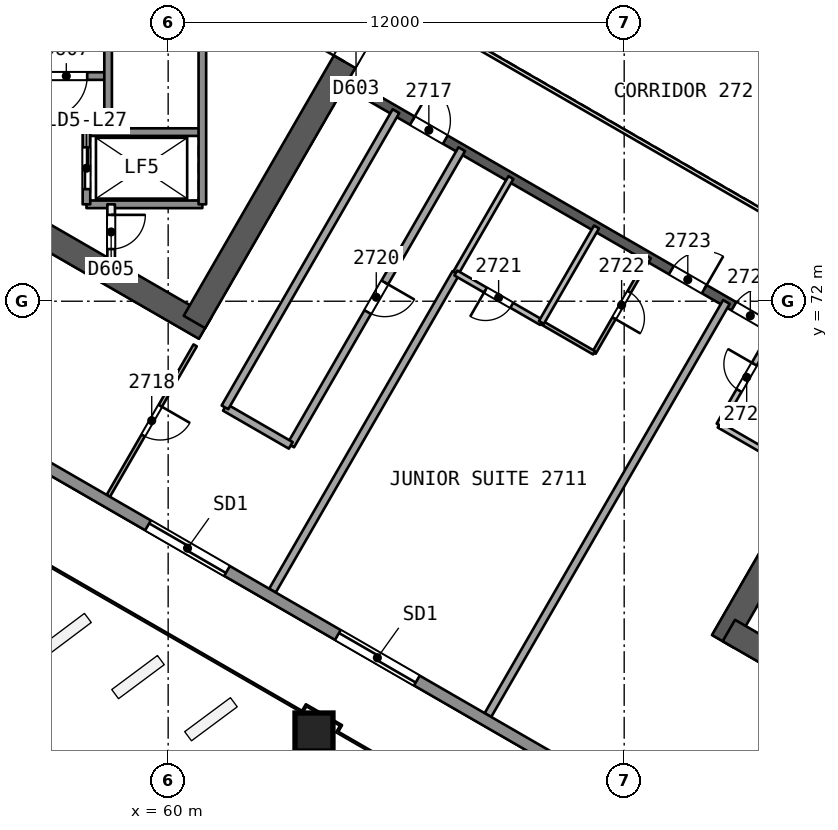
"""IFC4 building model, lengths in metres.
Left out: names, types, materials, properties, quantities, classifications, styles, units other than length and angle.
Written with IfcOpenShell. Run it as: python <this file> out.ifc"""

import sys

from ifc_helpers import new_model, si_unit, direction, frame, frame_2d, origin, origin_2d, place, context, subcontext, project, spatial, rectangle, extrude, element, fill, save


model = new_model("IFC4")
c1 = context("Model", 3, precision=1e-05, world=origin(), true_north=direction((0.0, 1.0)))
c2 = subcontext(c1, "Body", "Model", "MODEL_VIEW")
j1 = project(units=[si_unit("LENGTHUNIT", "METRE"), si_unit("PLANEANGLEUNIT", "RADIAN")], contexts=[c1])
p1 = place(None, origin())
s1 = spatial("IfcSite", under=j1, at=p1, CompositionType="ELEMENT")
p2 = place(p1, origin())
s2 = spatial("IfcBuilding", under=s1, at=p2, CompositionType="ELEMENT")
p3 = place(p2, frame((0.0, 0.0, 114.2)))
s3 = spatial("IfcBuildingStorey", under=s2, at=p3, CompositionType="ELEMENT", Elevation=114.2)
p4 = place(p3, frame((48.722, 78.365, 0.0), z_axis=(0.0, 0.0, 1.0), x_axis=(0.866020036431, -0.500009296414, 0.0)))
e1 = element("IfcWall", 1, at=p4, inside=s3, PredefinedType="SHEAR", context=c2, shape_type="SweptSolid", body=[
    extrude(rectangle(XDim=14.146, YDim=0.65, at=frame_2d((7.073, 0.0))), origin(), (0.0, 0.0, 1.0), 3.7),
])
p5 = place(p3, frame((60.691, 71.455, 0.0), z_axis=(0.0, 0.0, 1.0), x_axis=(0.499983075189, 0.866035175108, 0.0)))
e2 = element("IfcWall", 2, at=p5, inside=s3, PredefinedType="SHEAR", context=c2, shape_type="SweptSolid", body=[
    extrude(rectangle(XDim=10.055, YDim=0.65, at=frame_2d((5.027, 0.0))), origin(), (0.0, 0.0, 1.0), 3.7),
])
p6 = place(p5, frame((7.905, 0.0, 0.0)))
e3 = element("IfcOpeningElement", 3, at=p6, cuts=e2, PredefinedType="OPENING", context=c2, shape_type="SweptSolid", body=[
    extrude(rectangle(XDim=1.2, YDim=2.1, at=frame_2d((0.6, 1.05))), frame((0.0, 0.335, 0.0), z_axis=(0.0, -1.0, 0.0), x_axis=(1.0, 0.0, 0.0)), (0.0, 0.0, 1.0), 0.671),
])
p7 = place(p3, frame((79.688, 71.881, 0.0), z_axis=(0.0, 0.0, 1.0), x_axis=(-0.49999822179, -0.866026430432, 0.0)))
e4 = element("IfcWall", 4, at=p7, inside=s3, PredefinedType="SHEAR", context=c2, shape_type="SweptSolid", body=[
    extrude(rectangle(XDim=10.192, YDim=0.65, at=frame_2d((5.096, 0.0))), origin(), (0.0, 0.0, 1.0), 3.7),
])
p8 = place(p7, frame((0.762, 0.0, 0.0)))
e5 = element("IfcOpeningElement", 5, at=p8, cuts=e4, PredefinedType="OPENING", context=c2, shape_type="SweptSolid", body=[
    extrude(rectangle(XDim=1.2, YDim=2.1, at=frame_2d((0.6, 1.05))), frame((0.0, 0.335, 0.0), z_axis=(0.0, -1.0, 0.0), x_axis=(1.0, 0.0, 0.0)), (0.0, 0.0, 1.0), 0.671),
])
p9 = place(p3, frame((74.754, 63.335, 0.0), z_axis=(0.0, 0.0, 1.0), x_axis=(0.866026250715, -0.49999853307, 0.0)))
e6 = element("IfcWall", 6, at=p9, inside=s3, PredefinedType="SHEAR", context=c2, shape_type="SweptSolid", body=[
    extrude(rectangle(XDim=14.008, YDim=0.65, at=frame_2d((7.004, 0.0))), origin(), (0.0, 0.0, 1.0), 3.7),
])
p10 = place(p3, frame((64.7, 77.748, 0.0), z_axis=(0.0, 0.0, 1.0), x_axis=(0.866026492143, -0.499998114903, 0.0)))
e7 = element("IfcWall", 7, at=p10, inside=s3, PredefinedType="SHEAR", context=c2, shape_type="SweptSolid", body=[
    extrude(rectangle(XDim=15.588, YDim=0.25, at=frame_2d((7.794, 0.0))), origin(), (0.0, 0.0, 1.0), 3.25),
])
p11 = place(p10, frame((1.994, 0.0, 0.0)))
e8 = element("IfcOpeningElement", 8, at=p11, cuts=e7, PredefinedType="OPENING", context=c2, shape_type="SweptSolid", body=[
    extrude(rectangle(XDim=1.0, YDim=2.1, at=frame_2d((0.5, 1.05))), frame((0.0, 0.135, 0.0), z_axis=(0.0, -1.0, 0.0), x_axis=(1.0, 0.0, 0.0)), (0.0, 0.0, 1.0), 0.271),
])
p12 = place(p10, frame((9.862, 0.0, 0.0)))
e9 = element("IfcOpeningElement", 9, at=p12, cuts=e7, PredefinedType="OPENING", context=c2, shape_type="SweptSolid", body=[
    extrude(rectangle(XDim=1.0, YDim=2.1, at=frame_2d((0.5, 1.05))), frame((0.0, 0.135, 0.0), z_axis=(0.0, -1.0, 0.0), x_axis=(1.0, 0.0, 0.0)), (0.0, 0.0, 1.0), 0.271),
])
p13 = place(p10, frame((11.762, 0.0, 0.0)))
e10 = element("IfcOpeningElement", 10, at=p13, cuts=e7, PredefinedType="OPENING", context=c2, shape_type="SweptSolid", body=[
    extrude(rectangle(XDim=1.0, YDim=2.1, at=frame_2d((0.5, 1.05))), frame((0.0, 0.135, 0.0), z_axis=(0.0, -1.0, 0.0), x_axis=(1.0, 0.0, 0.0)), (0.0, 0.0, 1.0), 0.271),
])
p14 = place(p3, frame((63.825, 60.644, 0.0), z_axis=(0.010093620709, 0.017482414954, 0.999796221231), x_axis=(-0.866025993948, 0.499998977805, 1.48331e-07)))
e11 = element("IfcColumn", 11, at=p14, inside=s3, PredefinedType="COLUMN", context=c2, shape_type="SweptSolid", body=[
    extrude(rectangle(XDim=1.0, YDim=1.0, at=origin_2d()), origin(), (0.0, 0.0, 1.0), 3.701),
])
p15 = place(p3, frame((60.71, 70.838, 0.0), z_axis=(0.0, 0.0, 1.0), x_axis=(-0.499958188752, -0.866049542174, 0.0)))
e12 = element("IfcWall", 12, at=p15, inside=s3, PredefinedType="PARTITIONING", context=c2, shape_type="SweptSolid", body=[
    extrude(rectangle(XDim=4.572, YDim=0.1, at=frame_2d((2.286, 0.0))), origin(), (0.0, 0.0, 1.0), 3.25),
])
p16 = place(p15, frame((1.836, 0.0, 0.0)))
e13 = element("IfcOpeningElement", 13, at=p16, cuts=e12, PredefinedType="OPENING", context=c2, shape_type="SweptSolid", body=[
    extrude(rectangle(XDim=0.9, YDim=2.1, at=frame_2d((0.45, 1.05))), frame((0.0, 0.061, 0.0), z_axis=(0.0, -1.0, 0.0), x_axis=(1.0, 0.0, 0.0)), (0.0, 0.0, 1.0), 0.121),
])
p17 = place(p3, frame((67.726, 76.001, 0.0), z_axis=(0.0, 0.0, 1.0), x_axis=(-0.5000018851, -0.866024315419, 0.0)))
e14 = element("IfcWall", 14, at=p17, inside=s3, PredefinedType="PARTITIONING", context=c2, shape_type="SweptSolid", body=[
    extrude(rectangle(XDim=9.0, YDim=0.2, at=frame_2d((4.5, 0.0))), origin(), (0.0, 0.0, 1.0), 3.25),
])
p18 = place(p17, frame((4.05, 0.0, 0.0)))
e15 = element("IfcOpeningElement", 15, at=p18, cuts=e14, PredefinedType="OPENING", context=c2, shape_type="SweptSolid", body=[
    extrude(rectangle(XDim=0.9, YDim=2.1, at=frame_2d((0.45, 1.05))), frame((0.0, 0.11, 0.0), z_axis=(0.0, -1.0, 0.0), x_axis=(1.0, 0.0, 0.0)), (0.0, 0.0, 1.0), 0.221),
])
p19 = place(p3, frame((63.226, 68.207, 0.0), z_axis=(0.0, 0.0, 1.0), x_axis=(-0.866041268327, 0.499972520799, 0.0)))
e16 = element("IfcWall", 16, at=p19, inside=s3, PredefinedType="PARTITIONING", context=c2, shape_type="SweptSolid", body=[
    extrude(rectangle(XDim=2.0, YDim=0.2, at=frame_2d((1.0, 0.0))), origin(), (0.0, 0.0, 1.0), 3.25),
])
p20 = place(p3, frame((61.494, 69.207, 0.0), z_axis=(0.0, 0.0, 1.0), x_axis=(0.5000018851, 0.866024315419, 0.0)))
e17 = element("IfcWall", 17, at=p20, inside=s3, PredefinedType="PARTITIONING", context=c2, shape_type="SweptSolid", body=[
    extrude(rectangle(XDim=9.0, YDim=0.2, at=frame_2d((4.5, 0.0))), origin(), (0.0, 0.0, 1.0), 3.25),
])
p21 = place(p3, frame((62.744, 64.385, 0.0), z_axis=(0.0, 0.0, 1.0), x_axis=(0.500007845664, 0.866020874041, 0.0)))
e18 = element("IfcWall", 18, at=p21, inside=s3, PredefinedType="PARTITIONING", context=c2, shape_type="SweptSolid", body=[
    extrude(rectangle(XDim=9.651, YDim=0.2, at=frame_2d((4.826, 0.0))), origin(), (0.0, 0.0, 1.0), 3.25),
])
p22 = place(p3, frame((67.57, 72.743, 0.0), z_axis=(0.0, 0.0, 1.0), x_axis=(0.499987231761, 0.866032775405, 0.0)))
e19 = element("IfcWall", 19, at=p22, inside=s3, PredefinedType="PARTITIONING", context=c2, shape_type="SweptSolid", body=[
    extrude(rectangle(XDim=2.9, YDim=0.15, at=frame_2d((1.45, 0.0))), origin(), (0.0, 0.0, 1.0), 3.25),
])
p23 = place(p3, frame((69.822, 71.443, 0.0), z_axis=(0.0, 0.0, 1.0), x_axis=(-0.866021400173, 0.500006934395, 0.0)))
e20 = element("IfcWall", 20, at=p23, inside=s3, PredefinedType="PARTITIONING", context=c2, shape_type="SweptSolid", body=[
    extrude(rectangle(XDim=2.6, YDim=0.15, at=frame_2d((1.3, 0.0))), origin(), (0.0, 0.0, 1.0), 3.25),
])
p24 = place(p23, frame((0.9, 0.0, 0.0)))
e21 = element("IfcOpeningElement", 21, at=p24, cuts=e20, PredefinedType="OPENING", context=c2, shape_type="SweptSolid", body=[
    extrude(rectangle(XDim=0.8, YDim=2.1, at=frame_2d((0.4, 1.05))), frame((0.0, 0.085, 0.0), z_axis=(0.0, -1.0, 0.0), x_axis=(1.0, 0.0, 0.0)), (0.0, 0.0, 1.0), 0.171),
])
p25 = place(p3, frame((72.657, 73.154, 0.0), z_axis=(0.0, 0.0, 1.0), x_axis=(-0.499987231761, -0.866032775405, 0.0)))
e22 = element("IfcWall", 22, at=p25, inside=s3, PredefinedType="PARTITIONING", context=c2, shape_type="SweptSolid", body=[
    extrude(rectangle(XDim=2.9, YDim=0.1, at=frame_2d((1.45, 0.0))), origin(), (0.0, 0.0, 1.0), 3.25),
])
p26 = place(p25, frame((1.05, 0.0, 0.0)))
e23 = element("IfcOpeningElement", 23, at=p26, cuts=e22, PredefinedType="OPENING", context=c2, shape_type="SweptSolid", body=[
    extrude(rectangle(XDim=0.8, YDim=2.1, at=frame_2d((0.4, 1.05))), frame((0.0, 0.061, 0.0), z_axis=(0.0, -1.0, 0.0), x_axis=(1.0, 0.0, 0.0)), (0.0, 0.0, 1.0), 0.121),
])
p27 = place(p3, frame((71.207, 70.643, 0.0), z_axis=(0.0, 0.0, 1.0), x_axis=(-0.866055983265, 0.499947031044, 0.0)))
e24 = element("IfcWall", 24, at=p27, inside=s3, PredefinedType="PARTITIONING", context=c2, shape_type="SweptSolid", body=[
    extrude(rectangle(XDim=1.6, YDim=0.1, at=frame_2d((0.8, 0.0))), origin(), (0.0, 0.0, 1.0), 3.25),
])
p28 = place(p3, frame((68.415, 61.111, 0.0), z_axis=(0.0, 0.0, 1.0), x_axis=(0.499988493964, 0.866032046696, 0.0)))
e25 = element("IfcWall", 25, at=p28, inside=s3, PredefinedType="PARTITIONING", context=c2, shape_type="SweptSolid", body=[
    extrude(rectangle(XDim=12.551, YDim=0.2, at=frame_2d((6.275, 0.0))), origin(), (0.0, 0.0, 1.0), 3.25),
])
p29 = place(p3, frame((69.822, 71.443, 0.0), z_axis=(0.0, 0.0, 1.0), x_axis=(0.499987231761, 0.866032775405, 0.0)))
e26 = element("IfcWall", 26, at=p29, inside=s3, PredefinedType="PARTITIONING", context=c2, shape_type="SweptSolid", body=[
    extrude(rectangle(XDim=2.9, YDim=0.15, at=frame_2d((1.45, 0.0))), origin(), (0.0, 0.0, 1.0), 3.25),
])
p30 = place(p3, frame((76.578, 67.542, 0.0), z_axis=(0.0, 0.0, 1.0), x_axis=(-0.866038271014, 0.499977712642, 0.0)))
e27 = element("IfcWall", 27, at=p30, inside=s3, PredefinedType="PARTITIONING", context=c2, shape_type="SweptSolid", body=[
    extrude(rectangle(XDim=2.401, YDim=0.15, at=frame_2d((1.2, 0.0))), origin(), (0.0, 0.0, 1.0), 3.25),
])
p31 = place(p3, frame((74.498, 68.743, 0.0), z_axis=(0.0, 0.0, 1.0), x_axis=(0.499987231761, 0.866032775405, 0.0)))
e28 = element("IfcWall", 28, at=p31, inside=s3, PredefinedType="PARTITIONING", context=c2, shape_type="SweptSolid", body=[
    extrude(rectangle(XDim=2.9, YDim=0.15, at=frame_2d((1.45, 0.0))), origin(), (0.0, 0.0, 1.0), 3.25),
])
p32 = place(p31, frame((1.05, 0.0, 0.0)))
e29 = element("IfcOpeningElement", 29, at=p32, cuts=e28, PredefinedType="OPENING", context=c2, shape_type="SweptSolid", body=[
    extrude(rectangle(XDim=0.8, YDim=2.1, at=frame_2d((0.4, 1.05))), frame((0.0, 0.085, 0.0), z_axis=(0.0, -1.0, 0.0), x_axis=(1.0, 0.0, 0.0)), (0.0, 0.0, 1.0), 0.171),
])
p33 = place(p3, frame((89.755, 48.618, 0.0), z_axis=(0.0, 0.0, 1.0), x_axis=(-0.866025424614, 0.499999963922, 0.0)))
e30 = element("IfcWall", 30, at=p33, inside=s3, PredefinedType="SOLIDWALL", context=c2, shape_type="SweptSolid", body=[
    extrude(rectangle(XDim=56.938, YDim=0.3, at=frame_2d((28.469, 0.0))), origin(), (0.0, 0.0, 1.0), 3.25),
])
p34 = place(p33, frame((32.569, 0.0, 0.0)))
e31 = element("IfcOpeningElement", 31, at=p34, cuts=e30, PredefinedType="OPENING", context=c2, shape_type="SweptSolid", body=[
    extrude(rectangle(XDim=2.4, YDim=2.4, at=frame_2d((1.2, 1.2))), frame((0.0, 0.161, 0.0), z_axis=(0.0, -1.0, 0.0), x_axis=(1.0, 0.0, 0.0)), (0.0, 0.0, 1.0), 0.321),
])
p35 = place(p33, frame((44.202, 0.0, 0.0)))
e32 = element("IfcOpeningElement", 32, at=p35, cuts=e30, PredefinedType="OPENING", context=c2, shape_type="SweptSolid", body=[
    extrude(rectangle(XDim=2.4, YDim=2.4, at=frame_2d((1.2, 1.2))), frame((0.0, 0.161, 0.0), z_axis=(0.0, -1.0, 0.0), x_axis=(1.0, 0.0, 0.0)), (0.0, 0.0, 1.0), 0.321),
])
p36 = place(p33, frame((11.12, 0.0, 0.0)))
e33 = element("IfcOpeningElement", 33, at=p36, cuts=e30, PredefinedType="OPENING", context=c2, shape_type="SweptSolid", body=[
    extrude(rectangle(XDim=2.4, YDim=2.4, at=frame_2d((1.2, 1.2))), frame((0.0, 0.161, 0.0), z_axis=(0.0, -1.0, 0.0), x_axis=(1.0, 0.0, 0.0)), (0.0, 0.0, 1.0), 0.321),
])
p37 = place(p33, frame((26.801, 0.0, 0.0)))
e34 = element("IfcOpeningElement", 34, at=p37, cuts=e30, PredefinedType="OPENING", context=c2, shape_type="SweptSolid", body=[
    extrude(rectangle(XDim=2.4, YDim=2.4, at=frame_2d((1.2, 1.2))), frame((0.0, 0.161, 0.0), z_axis=(0.0, -1.0, 0.0), x_axis=(1.0, 0.0, 0.0)), (0.0, 0.0, 1.0), 0.321),
])
p38 = place(p3, frame((58.42, 77.925, 0.0), z_axis=(0.0, 0.0, 1.0), x_axis=(-1.0, 0.0, 0.0)))
e35 = element("IfcWall", 35, at=p38, inside=s3, PredefinedType="SOLIDWALL", context=c2, shape_type="SweptSolid", body=[
    extrude(rectangle(XDim=7.7, YDim=0.2, at=frame_2d((3.85, 0.0))), origin(), (0.0, 0.0, 1.0), 3.25),
])
p39 = place(p38, frame((0.55, 0.0, 0.0)))
e36 = element("IfcOpeningElement", 36, at=p39, cuts=e35, PredefinedType="OPENING", context=c2, shape_type="SweptSolid", body=[
    extrude(rectangle(XDim=1.1, YDim=2.1, at=frame_2d((0.55, 1.05))), frame((0.0, 0.11, 0.0), z_axis=(0.0, -1.0, 0.0), x_axis=(1.0, 0.0, 0.0)), (0.0, 0.0, 1.0), 0.221),
])
for number, where, z_axis, x_axis in (
    (37, (60.9, 76.45, 0.0), (0.0, 0.0, 1.0), (-1.0, 0.0, 0.0)),
    (38, (60.9, 74.55, 0.0), (0.0, 0.0, 1.0), (-1.0, 0.0, 0.0)),
):
    element("IfcWall", number, at=place(p3, frame(where, z_axis=z_axis, x_axis=x_axis)), inside=s3, PredefinedType="SOLIDWALL", context=c2, shape_type="SweptSolid", body=[
        extrude(rectangle(XDim=3.05, YDim=0.2, at=frame_2d((1.525, 0.0))), origin(), (0.0, 0.0, 1.0), 3.25),
    ])
p40 = place(p3, frame((60.9, 85.45, 0.0), z_axis=(0.0, 0.0, 1.0), x_axis=(0.0, -1.0, 0.0)))
e39 = element("IfcWall", 39, at=p40, inside=s3, PredefinedType="SOLIDWALL", context=c2, shape_type="SweptSolid", body=[
    extrude(rectangle(XDim=10.9, YDim=0.2, at=frame_2d((5.45, 0.0))), origin(), (0.0, 0.0, 1.0), 3.25),
])
p41 = place(p40, frame((4.0, 0.0, 0.0)))
e40 = element("IfcOpeningElement", 40, at=p41, cuts=e39, PredefinedType="OPENING", context=c2, shape_type="SweptSolid", body=[
    extrude(rectangle(XDim=1.0, YDim=2.1, at=frame_2d((0.5, 1.05))), frame((0.0, 0.11, 0.0), z_axis=(0.0, -1.0, 0.0), x_axis=(1.0, 0.0, 0.0)), (0.0, 0.0, 1.0), 0.221),
])
p42 = place(p3, frame((58.5, 74.55, 0.0), z_axis=(0.0, 0.0, 1.0), x_axis=(0.0, -1.0, 0.0)))
e41 = element("IfcWall", 41, at=p42, inside=s3, PredefinedType="PARTITIONING", context=c2, shape_type="SweptSolid", body=[
    extrude(rectangle(XDim=1.455, YDim=0.2, at=frame_2d((0.728, 0.0))), origin(), (0.0, 0.0, 1.0), 3.25),
])
p43 = place(p42, frame((0.278, 0.0, 0.0)))
e42 = element("IfcOpeningElement", 42, at=p43, cuts=e41, PredefinedType="OPENING", context=c2, shape_type="SweptSolid", body=[
    extrude(rectangle(XDim=0.9, YDim=2.1, at=frame_2d((0.45, 1.05))), frame((0.0, 0.11, 0.0), z_axis=(0.0, -1.0, 0.0), x_axis=(1.0, 0.0, 0.0)), (0.0, 0.0, 1.0), 0.221),
])
p44 = place(p3, frame((58.42, 85.45, 0.0), z_axis=(0.0, 0.0, 1.0), x_axis=(0.0, -1.0, 0.0)))
e43 = element("IfcWall", 43, at=p44, inside=s3, PredefinedType="SOLIDWALL", context=c2, shape_type="SweptSolid", body=[
    extrude(rectangle(XDim=9.0, YDim=0.2, at=frame_2d((4.5, 0.0))), origin(), (0.0, 0.0, 1.0), 3.25),
])
p45 = place(p3, frame((57.85, 76.45, 0.0), z_axis=(0.0, 0.0, 1.0), x_axis=(0.0, -1.0, 0.0)))
e44 = element("IfcWall", 44, at=p45, inside=s3, PredefinedType="SOLIDWALL", context=c2, shape_type="SweptSolid", body=[
    extrude(rectangle(XDim=1.9, YDim=0.2, at=frame_2d((0.95, 0.0))), origin(), (0.0, 0.0, 1.0), 3.25),
])
p46 = place(p45, frame((0.4, 0.0, 0.0)))
e45 = element("IfcOpeningElement", 45, at=p46, cuts=e44, PredefinedType="OPENING", context=c2, shape_type="SweptSolid", body=[
    extrude(rectangle(XDim=1.1, YDim=2.1, at=frame_2d((0.55, 1.05))), frame((0.0, 0.11, 0.0), z_axis=(0.0, -1.0, 0.0), x_axis=(1.0, 0.0, 0.0)), (0.0, 0.0, 1.0), 0.221),
])
p47 = place(p3, frame((67.702, 78.948, 0.0), z_axis=(0.0, 0.0, 1.0), x_axis=(0.866026658274, -0.499997827154, 0.0)))
e46 = element("IfcWall", 46, at=p47, inside=s3, PredefinedType="PARTITIONING", context=c2, shape_type="SweptSolid", body=[
    extrude(rectangle(XDim=11.588, YDim=0.1, at=frame_2d((5.794, 0.0))), origin(), (0.0, 0.0, 1.0), 3.25),
])
p48 = place(p11, origin())
e47 = element("IfcDoor", 47, at=p48, inside=s3, OperationType="SINGLE_SWING_LEFT", PredefinedType="NOTDEFINED", context=c2, shape_type="SweptSolid", body=[
    extrude(rectangle(XDim=1.0, YDim=2.1, at=frame_2d((0.5, 1.05))), frame((0.0, 0.025, 0.0), z_axis=(0.0, -1.0, 0.0), x_axis=(1.0, 0.0, 0.0)), (0.0, 0.0, 1.0), 0.05),
])
fill(e8, e47)
p49 = place(p16, origin())
e48 = element("IfcDoor", 48, at=p49, inside=s3, OperationType="SINGLE_SWING_LEFT", PredefinedType="NOTDEFINED", context=c2, shape_type="SweptSolid", body=[
    extrude(rectangle(XDim=0.9, YDim=2.1, at=frame_2d((0.45, 1.05))), frame((0.0, 0.025, 0.0), z_axis=(0.0, -1.0, 0.0), x_axis=(1.0, 0.0, 0.0)), (0.0, 0.0, 1.0), 0.05),
])
fill(e13, e48)
p50 = place(p18, origin())
e49 = element("IfcDoor", 49, at=p50, inside=s3, OperationType="SINGLE_SWING_LEFT", PredefinedType="NOTDEFINED", context=c2, shape_type="SweptSolid", body=[
    extrude(rectangle(XDim=0.9, YDim=2.1, at=frame_2d((0.45, 1.05))), frame((0.0, 0.025, 0.0), z_axis=(0.0, -1.0, 0.0), x_axis=(1.0, 0.0, 0.0)), (0.0, 0.0, 1.0), 0.05),
])
fill(e15, e49)
p51 = place(p24, origin())
e50 = element("IfcDoor", 50, at=p51, inside=s3, OperationType="SINGLE_SWING_RIGHT", PredefinedType="NOTDEFINED", context=c2, shape_type="SweptSolid", body=[
    extrude(rectangle(XDim=0.8, YDim=2.1, at=frame_2d((0.4, 1.05))), frame((0.0, 0.025, 0.0), z_axis=(0.0, -1.0, 0.0), x_axis=(1.0, 0.0, 0.0)), (0.0, 0.0, 1.0), 0.05),
])
fill(e21, e50)
p52 = place(p26, origin())
e51 = element("IfcDoor", 51, at=p52, inside=s3, OperationType="SINGLE_SWING_RIGHT", PredefinedType="NOTDEFINED", context=c2, shape_type="SweptSolid", body=[
    extrude(rectangle(XDim=0.8, YDim=2.1, at=frame_2d((0.4, 1.05))), frame((0.0, 0.025, 0.0), z_axis=(0.0, -1.0, 0.0), x_axis=(1.0, 0.0, 0.0)), (0.0, 0.0, 1.0), 0.05),
])
fill(e23, e51)
p53 = place(p12, origin())
e52 = element("IfcDoor", 52, at=p53, inside=s3, OperationType="SINGLE_SWING_RIGHT", PredefinedType="NOTDEFINED", context=c2, shape_type="SweptSolid", body=[
    extrude(rectangle(XDim=1.0, YDim=2.1, at=frame_2d((0.5, 1.05))), frame((0.0, 0.025, 0.0), z_axis=(0.0, -1.0, 0.0), x_axis=(1.0, 0.0, 0.0)), (0.0, 0.0, 1.0), 0.05),
])
fill(e9, e52)
p54 = place(p32, origin())
e53 = element("IfcDoor", 53, at=p54, inside=s3, OperationType="SINGLE_SWING_RIGHT", PredefinedType="NOTDEFINED", context=c2, shape_type="SweptSolid", body=[
    extrude(rectangle(XDim=0.8, YDim=2.1, at=frame_2d((0.4, 1.05))), frame((0.0, 0.025, 0.0), z_axis=(0.0, -1.0, 0.0), x_axis=(1.0, 0.0, 0.0)), (0.0, 0.0, 1.0), 0.05),
])
fill(e29, e53)
p55 = place(p13, origin())
e54 = element("IfcDoor", 54, at=p55, inside=s3, OperationType="SINGLE_SWING_RIGHT", PredefinedType="NOTDEFINED", context=c2, shape_type="SweptSolid", body=[
    extrude(rectangle(XDim=1.0, YDim=2.1, at=frame_2d((0.5, 1.05))), frame((0.0, 0.025, 0.0), z_axis=(0.0, -1.0, 0.0), x_axis=(1.0, 0.0, 0.0)), (0.0, 0.0, 1.0), 0.05),
])
fill(e10, e54)
p56 = place(p34, origin())
e55 = element("IfcDoor", 55, at=p56, inside=s3, OperationType="SLIDING_TO_LEFT", PredefinedType="NOTDEFINED", context=c2, shape_type="SweptSolid", body=[
    extrude(rectangle(XDim=2.4, YDim=2.4, at=frame_2d((1.2, 1.2))), frame((0.0, 0.025, 0.0), z_axis=(0.0, -1.0, 0.0), x_axis=(1.0, 0.0, 0.0)), (0.0, 0.0, 1.0), 0.05),
])
fill(e31, e55)
p57 = place(p37, origin())
e56 = element("IfcDoor", 56, at=p57, inside=s3, OperationType="SLIDING_TO_RIGHT", PredefinedType="NOTDEFINED", context=c2, shape_type="SweptSolid", body=[
    extrude(rectangle(XDim=2.4, YDim=2.4, at=frame_2d((1.2, 1.2))), frame((0.0, 0.025, 0.0), z_axis=(0.0, -1.0, 0.0), x_axis=(1.0, 0.0, 0.0)), (0.0, 0.0, 1.0), 0.05),
])
fill(e34, e56)
p58 = place(p6, origin())
e57 = element("IfcDoor", 57, at=p58, inside=s3, OperationType="SINGLE_SWING_LEFT", PredefinedType="NOTDEFINED", context=c2, shape_type="SweptSolid", body=[
    extrude(rectangle(XDim=1.2, YDim=2.1, at=frame_2d((0.6, 1.05))), frame((0.0, 0.025, 0.0), z_axis=(0.0, -1.0, 0.0), x_axis=(1.0, 0.0, 0.0)), (0.0, 0.0, 1.0), 0.05),
])
fill(e3, e57)
p59 = place(p46, origin())
e58 = element("IfcDoor", 58, at=p59, inside=s3, OperationType="SLIDING_TO_RIGHT", PredefinedType="NOTDEFINED", context=c2, shape_type="SweptSolid", body=[
    extrude(rectangle(XDim=1.1, YDim=2.1, at=frame_2d((0.55, 1.05))), frame((0.0, 0.025, 0.0), z_axis=(0.0, -1.0, 0.0), x_axis=(1.0, 0.0, 0.0)), (0.0, 0.0, 1.0), 0.05),
])
fill(e45, e58)
p60 = place(p43, origin())
e59 = element("IfcDoor", 59, at=p60, inside=s3, OperationType="SINGLE_SWING_LEFT", PredefinedType="NOTDEFINED", context=c2, shape_type="SweptSolid", body=[
    extrude(rectangle(XDim=0.9, YDim=2.1, at=frame_2d((0.45, 1.05))), frame((0.0, 0.025, 0.0), z_axis=(0.0, -1.0, 0.0), x_axis=(1.0, 0.0, 0.0)), (0.0, 0.0, 1.0), 0.05),
])
fill(e42, e59)
p61 = place(p39, origin())
e60 = element("IfcDoor", 60, at=p61, inside=s3, OperationType="SINGLE_SWING_RIGHT", PredefinedType="NOTDEFINED", context=c2, shape_type="SweptSolid", body=[
    extrude(rectangle(XDim=1.1, YDim=2.1, at=frame_2d((0.55, 1.05))), frame((0.0, 0.025, 0.0), z_axis=(0.0, -1.0, 0.0), x_axis=(1.0, 0.0, 0.0)), (0.0, 0.0, 1.0), 0.05),
])
fill(e36, e60)
save(model, sys.argv[1])
